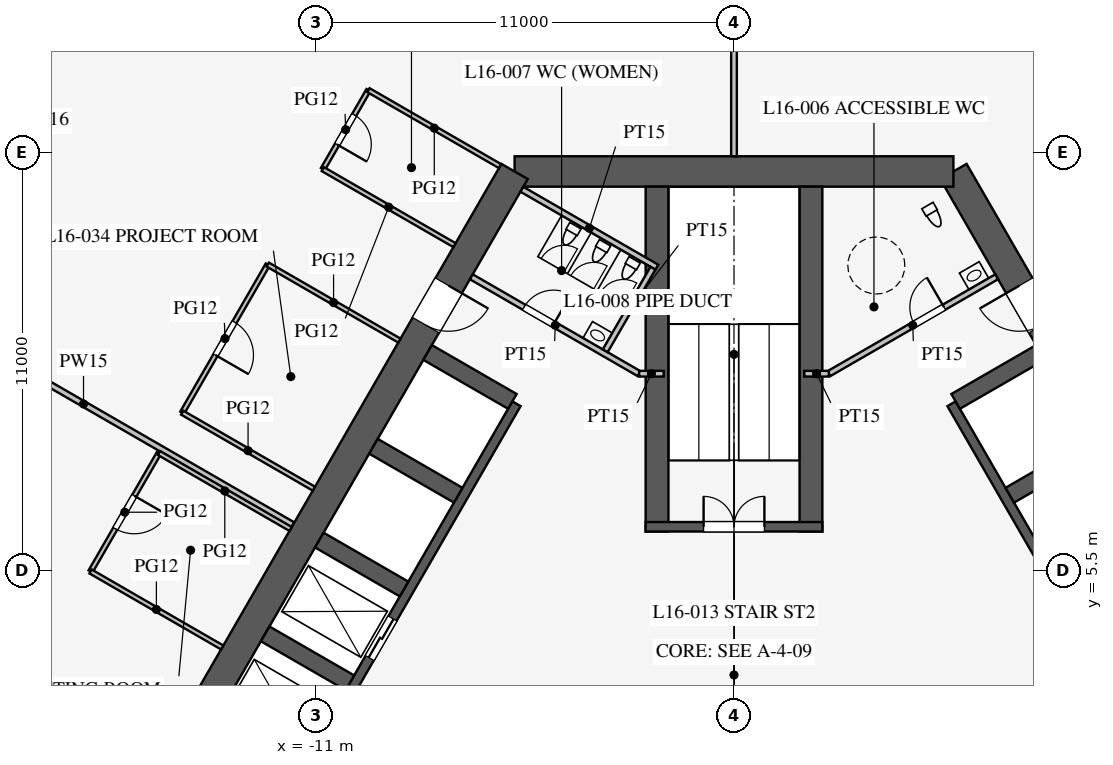
"""IFC4 building model, lengths in metres.
Left out: names, types, materials, properties, quantities, classifications, styles, units other than length and angle.
Written with IfcOpenShell. Run it as: python <this file> out.ifc"""

import sys

from ifc_helpers import new_model, si_unit, direction, frame, frame_2d, origin, place, context, subcontext, project, spatial, rectangle, extrude, element, fill, save


model = new_model("IFC4")
c1 = context("Model", 3, precision=1e-05, world=origin(), true_north=direction((0.0, 1.0)))
c2 = subcontext(c1, "Body", "Model", "MODEL_VIEW")
j1 = project(units=[si_unit("LENGTHUNIT", "METRE"), si_unit("PLANEANGLEUNIT", "RADIAN")], contexts=[c1])
p1 = place(None, origin())
s1 = spatial("IfcSite", under=j1, at=p1, CompositionType="ELEMENT")
p2 = place(p1, origin())
s2 = spatial("IfcBuilding", under=s1, at=p2, CompositionType="ELEMENT")
p3 = place(p2, frame((0.0, 0.0, 71.1)))
s3 = spatial("IfcBuildingStorey", under=s2, at=p3, CompositionType="ELEMENT", Elevation=71.1)
p4 = place(p3, frame((16.743, -3.0, 0.0), z_axis=(0.0, 0.0, 1.0), x_axis=(-0.500002442456, 0.866023993627, 0.0)))
e1 = element("IfcWall", 1, at=p4, inside=s3, PredefinedType="SHEAR", context=c2, shape_type="SweptSolid", body=[
    extrude(rectangle(XDim=21.939, YDim=0.8, at=frame_2d((10.97, 0.0))), origin(), (0.0, 0.0, 1.0), 4.2),
])
p5 = place(p4, frame((17.27, 0.0, 0.0)))
e2 = element("IfcOpeningElement", 2, at=p5, cuts=e1, PredefinedType="OPENING", context=c2, shape_type="SweptSolid", body=[
    extrude(rectangle(XDim=1.2, YDim=2.1, at=frame_2d((0.6, 1.05))), frame((0.0, 0.41, 0.0), z_axis=(0.0, -1.0, 0.0), x_axis=(1.0, 0.0, 0.0)), (0.0, 0.0, 1.0), 0.82),
])
p6 = place(p4, frame((3.47, 0.0, 0.0)))
e3 = element("IfcOpeningElement", 3, at=p6, cuts=e1, PredefinedType="OPENING", context=c2, shape_type="SweptSolid", body=[
    extrude(rectangle(XDim=1.2, YDim=2.1, at=frame_2d((0.6, 1.05))), frame((0.0, 0.41, 0.0), z_axis=(0.0, -1.0, 0.0), x_axis=(1.0, 0.0, 0.0)), (0.0, 0.0, 1.0), 0.82),
])
p7 = place(p3, frame((5.773, 16.0, 0.0), z_axis=(0.0, 0.0, 1.0), x_axis=(-1.0, 0.0, 0.0)))
e4 = element("IfcWall", 4, at=p7, inside=s3, PredefinedType="SHEAR", context=c2, shape_type="SweptSolid", body=[
    extrude(rectangle(XDim=11.547, YDim=0.8, at=frame_2d((5.773, 0.0))), origin(), (0.0, 0.0, 1.0), 4.2),
])
p8 = place(p3, frame((-5.773, 16.0, 0.0), z_axis=(0.0, 0.0, 1.0), x_axis=(-0.500002442456, -0.866023993627, 0.0)))
e5 = element("IfcWall", 5, at=p8, inside=s3, PredefinedType="SHEAR", context=c2, shape_type="SweptSolid", body=[
    extrude(rectangle(XDim=21.939, YDim=0.8, at=frame_2d((10.97, 0.0))), origin(), (0.0, 0.0, 1.0), 4.2),
])
p9 = place(p8, frame((17.27, 0.0, 0.0)))
e6 = element("IfcOpeningElement", 6, at=p9, cuts=e5, PredefinedType="OPENING", context=c2, shape_type="SweptSolid", body=[
    extrude(rectangle(XDim=1.2, YDim=2.1, at=frame_2d((0.6, 1.05))), frame((0.0, 0.41, 0.0), z_axis=(0.0, -1.0, 0.0), x_axis=(1.0, 0.0, 0.0)), (0.0, 0.0, 1.0), 0.82),
])
p10 = place(p8, frame((3.47, 0.0, 0.0)))
e7 = element("IfcOpeningElement", 7, at=p10, cuts=e5, PredefinedType="OPENING", context=c2, shape_type="SweptSolid", body=[
    extrude(rectangle(XDim=1.2, YDim=2.1, at=frame_2d((0.6, 1.05))), frame((0.0, 0.41, 0.0), z_axis=(0.0, -1.0, 0.0), x_axis=(1.0, 0.0, 0.0)), (0.0, 0.0, 1.0), 0.82),
])
p11 = place(p3, frame((11.424, 0.014, 0.0), z_axis=(0.0, 0.0, 1.0), x_axis=(-0.500001763848, 0.866024385424, 0.0)))
e8 = element("IfcWall", 8, at=p11, inside=s3, PredefinedType="SHEAR", context=c2, shape_type="SweptSolid", body=[
    extrude(rectangle(XDim=11.4, YDim=0.25, at=frame_2d((5.7, 0.0))), origin(), (0.0, 0.0, 1.0), 4.2),
])
p12 = place(p3, frame((7.257, 7.481, 0.0), z_axis=(0.0, 0.0, 1.0), x_axis=(0.866046643894, 0.499963209246, 0.0)))
e9 = element("IfcWall", 9, at=p12, inside=s3, PredefinedType="SHEAR", context=c2, shape_type="SweptSolid", body=[
    extrude(rectangle(XDim=2.575, YDim=0.45, at=frame_2d((1.288, 0.0))), origin(), (0.0, 0.0, 1.0), 4.2),
])
p13 = place(p3, frame((5.832, 9.949, 0.0), z_axis=(0.0, 0.0, 1.0), x_axis=(0.866029291668, 0.499993265928, 0.0)))
e10 = element("IfcWall", 10, at=p13, inside=s3, PredefinedType="SHEAR", context=c2, shape_type="SweptSolid", body=[
    extrude(rectangle(XDim=2.575, YDim=0.45, at=frame_2d((1.288, 0.0))), origin(), (0.0, 0.0, 1.0), 4.2),
])
p14 = place(p3, frame((-5.724, 9.886, 0.0), z_axis=(0.0, 0.0, 1.0), x_axis=(-0.500001763848, -0.866024385424, 0.0)))
e11 = element("IfcWall", 11, at=p14, inside=s3, PredefinedType="SHEAR", context=c2, shape_type="SweptSolid", body=[
    extrude(rectangle(XDim=11.4, YDim=0.25, at=frame_2d((5.7, 0.0))), origin(), (0.0, 0.0, 1.0), 4.2),
])
p15 = place(p14, frame((6.525, 0.0, 0.0)))
e12 = element("IfcOpeningElement", 12, at=p15, cuts=e11, PredefinedType="OPENING", context=c2, shape_type="SweptSolid", body=[
    extrude(rectangle(XDim=1.2, YDim=2.2, at=frame_2d((0.6, 1.1))), frame((0.0, 0.135, 0.0), z_axis=(0.0, -1.0, 0.0), x_axis=(1.0, 0.0, 0.0)), (0.0, 0.0, 1.0), 0.27),
])
p16 = place(p14, frame((9.375, 0.0, 0.0)))
e13 = element("IfcOpeningElement", 13, at=p16, cuts=e11, PredefinedType="OPENING", context=c2, shape_type="SweptSolid", body=[
    extrude(rectangle(XDim=1.2, YDim=2.2, at=frame_2d((0.6, 1.1))), frame((0.0, 0.135, 0.0), z_axis=(0.0, -1.0, 0.0), x_axis=(1.0, 0.0, 0.0)), (0.0, 0.0, 1.0), 0.27),
])
p17 = place(p3, frame((-5.832, 9.949, 0.0), z_axis=(0.0, 0.0, 1.0), x_axis=(-0.866029291668, 0.499993265928, 0.0)))
e14 = element("IfcWall", 14, at=p17, inside=s3, PredefinedType="SHEAR", context=c2, shape_type="SweptSolid", body=[
    extrude(rectangle(XDim=2.575, YDim=0.45, at=frame_2d((1.288, 0.0))), origin(), (0.0, 0.0, 1.0), 4.2),
])
for number, where, z_axis, x_axis in (
    (15, (-7.257, 7.481, 0.0), (0.0, 0.0, 1.0), (-0.866, 0.5, 0.0)),
    (16, (-8.682, 5.012, 0.0), (0.0, 0.0, 1.0), (-0.866, 0.5, 0.0)),
    (17, (-10.107, 2.544, 0.0), (0.0, 0.0, 1.0), (-0.866, 0.5, 0.0)),
):
    element("IfcWall", number, at=place(p3, frame(where, z_axis=z_axis, x_axis=x_axis)), inside=s3, PredefinedType="SHEAR", context=c2, shape_type="SweptSolid", body=[
        extrude(rectangle(XDim=2.575, YDim=0.45, at=frame_2d((1.288, 0.0))), origin(), (0.0, 0.0, 1.0), 4.2),
    ])
for number, where, z_axis, x_axis in (
    (18, (2.025, 6.525, 0.0), (0.0, 0.0, 1.0), (0.0, 1.0, 0.0)),
    (19, (-2.025, 6.525, 0.0), (0.0, 0.0, 1.0), (0.0, 1.0, 0.0)),
):
    element("IfcWall", number, at=place(p3, frame(where, z_axis=z_axis, x_axis=x_axis)), inside=s3, PredefinedType="SHEAR", context=c2, shape_type="SweptSolid", body=[
        extrude(rectangle(XDim=9.075, YDim=0.6, at=frame_2d((4.538, 0.0))), origin(), (0.0, 0.0, 1.0), 4.2),
    ])
p18 = place(p3, frame((2.325, 6.65, 0.0), z_axis=(0.0, 0.0, 1.0), x_axis=(-1.0, 0.0, 0.0)))
e20 = element("IfcWall", 20, at=p18, inside=s3, PredefinedType="SHEAR", context=c2, shape_type="SweptSolid", body=[
    extrude(rectangle(XDim=4.65, YDim=0.25, at=frame_2d((2.325, 0.0))), origin(), (0.0, 0.0, 1.0), 4.2),
])
p19 = place(p18, frame((1.525, 0.0, 0.0)))
e21 = element("IfcOpeningElement", 21, at=p19, cuts=e20, PredefinedType="OPENING", context=c2, shape_type="SweptSolid", body=[
    extrude(rectangle(XDim=1.6, YDim=2.1, at=frame_2d((0.8, 1.05))), frame((0.0, 0.135, 0.0), z_axis=(0.0, -1.0, 0.0), x_axis=(1.0, 0.0, 0.0)), (0.0, 0.0, 1.0), 0.27),
])
p20 = place(p3, frame((2.495, 10.678, 0.0), z_axis=(0.0, 0.0, 1.0), x_axis=(0.86602216432, 0.500005610874, 0.0)))
e22 = element("IfcWall", 22, at=p20, inside=s3, PredefinedType="PARTITIONING", context=c2, shape_type="SweptSolid", body=[
    extrude(rectangle(XDim=5.1, YDim=0.15, at=frame_2d((2.55, 0.0))), origin(), (0.0, 0.0, 1.0), 4.0),
])
p21 = place(p20, frame((2.6, 0.0, 0.0)))
e23 = element("IfcOpeningElement", 23, at=p21, cuts=e22, PredefinedType="OPENING", context=c2, shape_type="SweptSolid", body=[
    extrude(rectangle(XDim=0.9, YDim=2.1, at=frame_2d((0.45, 1.05))), frame((0.0, 0.085, 0.0), z_axis=(0.0, -1.0, 0.0), x_axis=(1.0, 0.0, 0.0)), (0.0, 0.0, 1.0), 0.17),
])
p22 = place(p3, frame((-2.495, 10.678, 0.0), z_axis=(0.0, 0.0, 1.0), x_axis=(-0.86602216432, 0.500005610874, 0.0)))
e24 = element("IfcWall", 24, at=p22, inside=s3, PredefinedType="PARTITIONING", context=c2, shape_type="SweptSolid", body=[
    extrude(rectangle(XDim=5.1, YDim=0.15, at=frame_2d((2.55, 0.0))), origin(), (0.0, 0.0, 1.0), 4.0),
])
p23 = place(p22, frame((2.6, 0.0, 0.0)))
e25 = element("IfcOpeningElement", 25, at=p23, cuts=e24, PredefinedType="OPENING", context=c2, shape_type="SweptSolid", body=[
    extrude(rectangle(XDim=0.9, YDim=2.1, at=frame_2d((0.45, 1.05))), frame((0.0, 0.085, 0.0), z_axis=(0.0, -1.0, 0.0), x_axis=(1.0, 0.0, 0.0)), (0.0, 0.0, 1.0), 0.17),
])
for number, where, z_axis, x_axis in (
    (26, (2.495, 10.678, 0.0), (0.0, 0.0, 1.0), (-1.0, 0.0, 0.0)),
    (27, (-2.495, 10.678, 0.0), (0.0, 0.0, 1.0), (1.0, 0.0, 0.0)),
):
    element("IfcWall", number, at=place(p3, frame(where, z_axis=z_axis, x_axis=x_axis)), inside=s3, PredefinedType="PARTITIONING", context=c2, shape_type="SweptSolid", body=[
        extrude(rectangle(XDim=0.645, YDim=0.15, at=frame_2d((0.323, 0.0))), origin(), (0.0, 0.0, 1.0), 4.0),
    ])
p24 = place(p3, frame((-2.031, 13.482, 0.0), z_axis=(0.0, 0.0, 1.0), x_axis=(-0.866050731258, 0.499956128963, 0.0)))
e28 = element("IfcWall", 28, at=p24, inside=s3, PredefinedType="PARTITIONING", context=c2, shape_type="SweptSolid", body=[
    extrude(rectangle(XDim=4.1, YDim=0.15, at=frame_2d((2.05, 0.0))), origin(), (0.0, 0.0, 1.0), 4.0),
])
p25 = place(p3, frame((-3.389, 11.281, 0.0), z_axis=(0.0, 0.0, 1.0), x_axis=(0.499989096993, 0.866031698547, 0.0)))
e29 = element("IfcWall", 29, at=p25, inside=s3, PredefinedType="PARTITIONING", context=c2, shape_type="SweptSolid", body=[
    extrude(rectangle(XDim=2.51, YDim=0.15, at=frame_2d((1.255, 0.0))), origin(), (0.0, 0.0, 1.0), 4.0),
])
p26 = place(p3, frame((0.0, 16.4, 0.0), z_axis=(0.0, 0.0, 1.0), x_axis=(0.0, 1.0, 0.0)))
e30 = element("IfcWall", 30, at=p26, inside=s3, PredefinedType="PARTITIONING", context=c2, shape_type="SweptSolid", body=[
    extrude(rectangle(XDim=18.25, YDim=0.15, at=frame_2d((9.125, 0.0))), origin(), (0.0, 0.0, 1.0), 2.3),
])
p27 = place(p3, frame((-11.613, 6.705, 0.0), z_axis=(0.0, 0.0, 1.0), x_axis=(-0.866029791586, 0.499992400027, 0.0)))
e31 = element("IfcWall", 31, at=p27, inside=s3, PredefinedType="PARTITIONING", context=c2, shape_type="SweptSolid", body=[
    extrude(rectangle(XDim=12.709, YDim=0.15, at=frame_2d((6.354, 0.0))), origin(), (0.0, 0.0, 1.0), 2.8),
])
p28 = place(p3, frame((-15.131, 8.592, 0.0), z_axis=(0.0, 0.0, 1.0), x_axis=(-0.500012057535, -0.866018442252, 0.0)))
e32 = element("IfcWall", 32, at=p28, inside=s3, PredefinedType="PARTITIONING", context=c2, shape_type="SweptSolid", body=[
    extrude(rectangle(XDim=3.6, YDim=0.12, at=frame_2d((1.8, 0.0))), origin(), (0.0, 0.0, 1.0), 2.9),
])
p29 = place(p28, frame((1.3, 0.0, 0.15)))
e33 = element("IfcOpeningElement", 33, at=p29, cuts=e32, PredefinedType="OPENING", context=c2, shape_type="SweptSolid", body=[
    extrude(rectangle(XDim=1.0, YDim=2.1, at=frame_2d((0.5, 1.05))), frame((0.0, 0.07, 0.0), z_axis=(0.0, -1.0, 0.0), x_axis=(1.0, 0.0, 0.0)), (0.0, 0.0, 1.0), 0.14),
])
p30 = place(p3, frame((-9.619, 18.14, 0.0), z_axis=(0.0, 0.0, 1.0), x_axis=(-0.500001309137, -0.866024647952, 0.0)))
e34 = element("IfcWall", 34, at=p30, inside=s3, PredefinedType="PARTITIONING", context=c2, shape_type="SweptSolid", body=[
    extrude(rectangle(XDim=2.4, YDim=0.12, at=frame_2d((1.2, 0.0))), origin(), (0.0, 0.0, 1.0), 2.9),
])
p31 = place(p30, frame((0.75, 0.0, 0.15)))
e35 = element("IfcOpeningElement", 35, at=p31, cuts=e34, PredefinedType="OPENING", context=c2, shape_type="SweptSolid", body=[
    extrude(rectangle(XDim=0.9, YDim=2.1, at=frame_2d((0.45, 1.05))), frame((0.0, 0.07, 0.0), z_axis=(0.0, -1.0, 0.0), x_axis=(1.0, 0.0, 0.0)), (0.0, 0.0, 1.0), 0.14),
])
p32 = place(p3, frame((-12.269, 13.55, 0.0), z_axis=(0.0, 0.0, 1.0), x_axis=(-0.499990139034, -0.866031096941, 0.0)))
e36 = element("IfcWall", 36, at=p32, inside=s3, PredefinedType="PARTITIONING", context=c2, shape_type="SweptSolid", body=[
    extrude(rectangle(XDim=4.5, YDim=0.12, at=frame_2d((2.25, 0.0))), origin(), (0.0, 0.0, 1.0), 2.9),
])
p33 = place(p32, frame((1.75, 0.0, 0.15)))
e37 = element("IfcOpeningElement", 37, at=p33, cuts=e36, PredefinedType="OPENING", context=c2, shape_type="SweptSolid", body=[
    extrude(rectangle(XDim=1.0, YDim=2.1, at=frame_2d((0.5, 1.05))), frame((0.0, 0.07, 0.0), z_axis=(0.0, -1.0, 0.0), x_axis=(1.0, 0.0, 0.0)), (0.0, 0.0, 1.0), 0.14),
])
p34 = place(p3, frame((-11.667, 6.592, 0.0), z_axis=(0.0, 0.0, 1.0), x_axis=(-0.866026010844, 0.49999894854, 0.0)))
e38 = element("IfcWall", 38, at=p34, inside=s3, PredefinedType="PARTITIONING", context=c2, shape_type="SweptSolid", body=[
    extrude(rectangle(XDim=4.0, YDim=0.12, at=frame_2d((2.0, 0.0))), origin(), (0.0, 0.0, 1.0), 2.8),
])
for number, where, z_axis, x_axis in (
    (39, (-13.467, 3.474, 0.0), (0.0, 0.0, 1.0), (-0.866, 0.5, 0.0)),
    (40, (-11.055, 7.653, 0.0), (0.0, 0.0, 1.0), (-0.866, 0.5, 0.0)),
    (41, (-6.155, 16.14, 0.0), (0.0, 0.0, 1.0), (-0.866, 0.5, 0.0)),
    (42, (-8.805, 11.55, 0.0), (0.0, 0.0, 1.0), (-0.866, 0.5, 0.0)),
    (43, (-7.355, 14.061, 0.0), (0.0, 0.0, 1.0), (-0.866, 0.5, 0.0)),
):
    element("IfcWall", number, at=place(p3, frame(where, z_axis=z_axis, x_axis=x_axis)), inside=s3, PredefinedType="PARTITIONING", context=c2, shape_type="SweptSolid", body=[
        extrude(rectangle(XDim=4.0, YDim=0.12, at=frame_2d((2.0, 0.0))), origin(), (0.0, 0.0, 1.0), 2.9),
    ])
p35 = place(p21, origin())
e44 = element("IfcDoor", 44, at=p35, inside=s3, OperationType="SINGLE_SWING_RIGHT", PredefinedType="DOOR", context=c2, shape_type="SweptSolid", body=[
    extrude(rectangle(XDim=0.9, YDim=2.1, at=frame_2d((0.45, 1.05))), frame((0.0, 0.025, 0.0), z_axis=(0.0, -1.0, 0.0), x_axis=(1.0, 0.0, 0.0)), (0.0, 0.0, 1.0), 0.05),
])
fill(e23, e44)
p36 = place(p23, frame((0.9, 0.0, 0.0), z_axis=(0.0, 0.0, 1.0), x_axis=(-1.0, 0.0, 0.0)))
e45 = element("IfcDoor", 45, at=p36, inside=s3, OperationType="SINGLE_SWING_RIGHT", PredefinedType="DOOR", context=c2, shape_type="SweptSolid", body=[
    extrude(rectangle(XDim=0.9, YDim=2.1, at=frame_2d((0.45, 1.05))), frame((0.0, 0.025, 0.0), z_axis=(0.0, -1.0, 0.0), x_axis=(1.0, 0.0, 0.0)), (0.0, 0.0, 1.0), 0.05),
])
fill(e25, e45)
p37 = place(p19, frame((1.6, 0.0, 0.0), z_axis=(0.0, 0.0, 1.0), x_axis=(-1.0, 0.0, 0.0)))
e46 = element("IfcDoor", 46, at=p37, inside=s3, OperationType="DOUBLE_DOOR_SINGLE_SWING", PredefinedType="DOOR", context=c2, shape_type="SweptSolid", body=[
    extrude(rectangle(XDim=1.6, YDim=2.1, at=frame_2d((0.8, 1.05))), frame((0.0, 0.025, 0.0), z_axis=(0.0, -1.0, 0.0), x_axis=(1.0, 0.0, 0.0)), (0.0, 0.0, 1.0), 0.05),
])
fill(e21, e46)
p38 = place(p5, origin())
e47 = element("IfcDoor", 47, at=p38, inside=s3, OperationType="SINGLE_SWING_RIGHT", PredefinedType="DOOR", context=c2, shape_type="SweptSolid", body=[
    extrude(rectangle(XDim=1.2, YDim=2.1, at=frame_2d((0.6, 1.05))), frame((0.0, 0.025, 0.0), z_axis=(0.0, -1.0, 0.0), x_axis=(1.0, 0.0, 0.0)), (0.0, 0.0, 1.0), 0.05),
])
fill(e2, e47)
p39 = place(p10, origin())
e48 = element("IfcDoor", 48, at=p39, inside=s3, OperationType="SINGLE_SWING_LEFT", PredefinedType="DOOR", context=c2, shape_type="SweptSolid", body=[
    extrude(rectangle(XDim=1.2, YDim=2.1, at=frame_2d((0.6, 1.05))), frame((0.0, 0.025, 0.0), z_axis=(0.0, -1.0, 0.0), x_axis=(1.0, 0.0, 0.0)), (0.0, 0.0, 1.0), 0.05),
])
fill(e7, e48)
p40 = place(p33, origin())
e49 = element("IfcDoor", 49, at=p40, inside=s3, OperationType="SINGLE_SWING_RIGHT", PredefinedType="DOOR", context=c2, shape_type="SweptSolid", body=[
    extrude(rectangle(XDim=1.0, YDim=2.1, at=frame_2d((0.5, 1.05))), frame((0.0, 0.025, 0.0), z_axis=(0.0, -1.0, 0.0), x_axis=(1.0, 0.0, 0.0)), (0.0, 0.0, 1.0), 0.05),
])
fill(e37, e49)
p41 = place(p29, origin())
e50 = element("IfcDoor", 50, at=p41, inside=s3, OperationType="SINGLE_SWING_LEFT", PredefinedType="DOOR", context=c2, shape_type="SweptSolid", body=[
    extrude(rectangle(XDim=1.0, YDim=2.1, at=frame_2d((0.5, 1.05))), frame((0.0, 0.025, 0.0), z_axis=(0.0, -1.0, 0.0), x_axis=(1.0, 0.0, 0.0)), (0.0, 0.0, 1.0), 0.05),
])
fill(e33, e50)
p42 = place(p31, origin())
e51 = element("IfcDoor", 51, at=p42, inside=s3, OperationType="SINGLE_SWING_RIGHT", PredefinedType="DOOR", context=c2, shape_type="SweptSolid", body=[
    extrude(rectangle(XDim=0.9, YDim=2.1, at=frame_2d((0.45, 1.05))), frame((0.0, 0.025, 0.0), z_axis=(0.0, -1.0, 0.0), x_axis=(1.0, 0.0, 0.0)), (0.0, 0.0, 1.0), 0.05),
])
fill(e35, e51)
p43 = place(p15, origin())
e52 = element("IfcDoor", 52, at=p43, inside=s3, OperationType="DOUBLE_DOOR_SLIDING", PredefinedType="DOOR", context=c2, shape_type="SweptSolid", body=[
    extrude(rectangle(XDim=1.2, YDim=2.2, at=frame_2d((0.6, 1.1))), frame((0.0, 0.025, 0.0), z_axis=(0.0, -1.0, 0.0), x_axis=(1.0, 0.0, 0.0)), (0.0, 0.0, 1.0), 0.05),
])
fill(e12, e52)
save(model, sys.argv[1])
